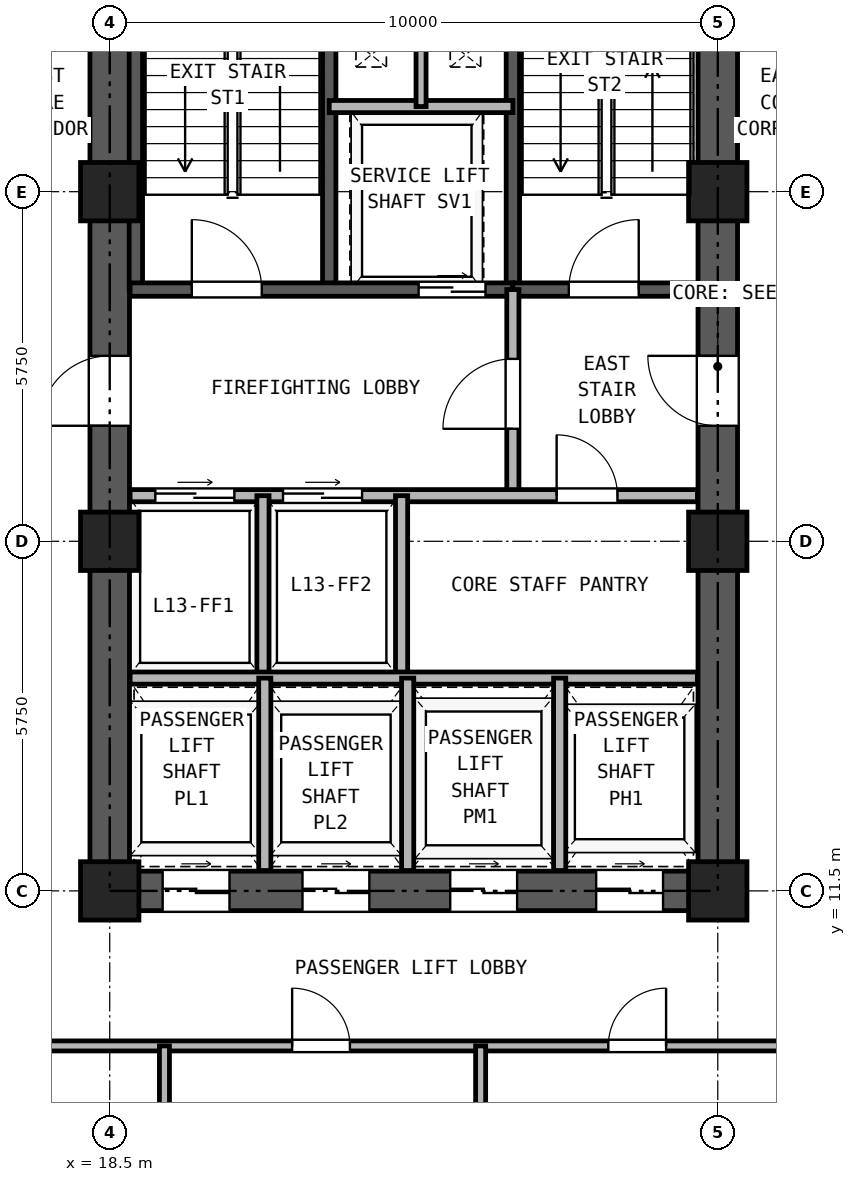
"""IFC4 building model, lengths in metres.
Left out: names, types, materials, properties, quantities, classifications, styles, units other than length and angle.
Written with IfcOpenShell. Run it as: python <this file> out.ifc"""

import sys

from ifc_helpers import new_model, si_unit, direction, frame, frame_2d, origin, origin_2d, place, context, subcontext, project, spatial, rectangle, hollow_rectangle, extrude, source, transform, mapped, element, fill, save


model = new_model("IFC4")
c1 = context("Model", 3, precision=1e-05, world=origin(), true_north=direction((0.0, 1.0)))
c2 = subcontext(c1, "Body", "Model", "MODEL_VIEW")
j1 = project(units=[si_unit("LENGTHUNIT", "METRE"), si_unit("PLANEANGLEUNIT", "RADIAN")], contexts=[c1])
p1 = place(None, origin())
s1 = spatial("IfcSite", under=j1, at=p1, CompositionType="ELEMENT")
p2 = place(p1, origin())
s2 = spatial("IfcBuilding", under=s1, at=p2, CompositionType="ELEMENT")
p3 = place(p2, frame((0.0, 0.0, 51.3)))
s3 = spatial("IfcBuildingStorey", under=s2, at=p3, CompositionType="ELEMENT", Elevation=51.3)
m1 = source(origin(), c2, "Body", "SweptSolid", [
    extrude(hollow_rectangle(XDim=0.96, YDim=0.96, WallThickness=0.06, at=origin_2d()), origin(), (0.0, 0.0, 1.0), 3.32),
])
for number, where, z_axis, x_axis in (
    (1, (18.5, 11.5, 0.0), (0.0, 0.0, 1.0), (1.0, 0.0, 0.0)),
    (2, (18.5, 17.25, 0.0), (0.0, 0.0, 1.0), (1.0, 0.0, 0.0)),
    (3, (18.5, 23.0, 0.0), (0.0, 0.0, 1.0), (1.0, 0.0, 0.0)),
    (4, (28.5, 11.5, 0.0), (0.0, 0.0, 1.0), (1.0, 0.0, 0.0)),
    (5, (28.5, 17.25, 0.0), (0.0, 0.0, 1.0), (1.0, 0.0, 0.0)),
    (6, (28.5, 23.0, 0.0), (0.0, 0.0, 1.0), (1.0, 0.0, 0.0)),
):
    element("IfcColumn", number, at=place(p3, frame(where, z_axis=z_axis, x_axis=x_axis)), inside=s3, PredefinedType="COLUMN", context=c2, shape_type="MappedRepresentation", body=[
        mapped(m1, transform((0.0, 0.0, 0.0), x_axis=(1.0, 0.0, 0.0), y_axis=(0.0, 1.0, 0.0), z_axis=(0.0, 0.0, 1.0), scale=1.0)),
    ])
p4 = place(p3, frame((18.175, 11.5, 0.0), z_axis=(0.0, 0.0, 1.0), x_axis=(1.0, 0.0, 0.0)))
e7 = element("IfcWall", 7, at=p4, inside=s3, PredefinedType="SHEAR", context=c2, shape_type="SweptSolid", body=[
    extrude(rectangle(XDim=10.65, YDim=0.65, at=frame_2d((5.325, 0.0))), origin(), (0.0, 0.0, 1.0), 3.32),
])
p5 = place(p4, frame((1.195, 0.0, 0.0)))
e8 = element("IfcOpeningElement", 8, at=p5, cuts=e7, PredefinedType="OPENING", context=c2, shape_type="SweptSolid", body=[
    extrude(rectangle(XDim=1.1, YDim=2.25, at=frame_2d((0.55, 1.125))), frame((0.0, 0.335, 0.0), z_axis=(0.0, -1.0, 0.0), x_axis=(1.0, 0.0, 0.0)), (0.0, 0.0, 1.0), 0.67),
])
p6 = place(p4, frame((3.495, 0.0, 0.0)))
e9 = element("IfcOpeningElement", 9, at=p6, cuts=e7, PredefinedType="OPENING", context=c2, shape_type="SweptSolid", body=[
    extrude(rectangle(XDim=1.1, YDim=2.25, at=frame_2d((0.55, 1.125))), frame((0.0, 0.335, 0.0), z_axis=(0.0, -1.0, 0.0), x_axis=(1.0, 0.0, 0.0)), (0.0, 0.0, 1.0), 0.67),
])
p7 = place(p4, frame((5.925, 0.0, 0.0)))
e10 = element("IfcOpeningElement", 10, at=p7, cuts=e7, PredefinedType="OPENING", context=c2, shape_type="SweptSolid", body=[
    extrude(rectangle(XDim=1.1, YDim=2.25, at=frame_2d((0.55, 1.125))), frame((0.0, 0.335, 0.0), z_axis=(0.0, -1.0, 0.0), x_axis=(1.0, 0.0, 0.0)), (0.0, 0.0, 1.0), 0.67),
])
p8 = place(p4, frame((8.325, 0.0, 0.0)))
e11 = element("IfcOpeningElement", 11, at=p8, cuts=e7, PredefinedType="OPENING", context=c2, shape_type="SweptSolid", body=[
    extrude(rectangle(XDim=1.1, YDim=2.25, at=frame_2d((0.55, 1.125))), frame((0.0, 0.335, 0.0), z_axis=(0.0, -1.0, 0.0), x_axis=(1.0, 0.0, 0.0)), (0.0, 0.0, 1.0), 0.67),
])
p9 = place(p3, frame((18.5, 11.825, 0.0), z_axis=(0.0, 0.0, 1.0), x_axis=(0.0, 1.0, 0.0)))
e12 = element("IfcWall", 12, at=p9, inside=s3, PredefinedType="SHEAR", context=c2, shape_type="SweptSolid", body=[
    extrude(rectangle(XDim=16.6, YDim=0.65, at=frame_2d((8.3, 0.0))), origin(), (0.0, 0.0, 1.0), 3.32),
])
p10 = place(p9, frame((7.325, 0.0, 0.0)))
e13 = element("IfcOpeningElement", 13, at=p10, cuts=e12, PredefinedType="OPENING", context=c2, shape_type="SweptSolid", body=[
    extrude(rectangle(XDim=1.15, YDim=2.2, at=frame_2d((0.575, 1.1))), frame((0.0, 0.335, 0.0), z_axis=(0.0, -1.0, 0.0), x_axis=(1.0, 0.0, 0.0)), (0.0, 0.0, 1.0), 0.67),
])
p11 = place(p3, frame((28.5, 11.825, 0.0), z_axis=(0.0, 0.0, 1.0), x_axis=(0.0, 1.0, 0.0)))
e14 = element("IfcWall", 14, at=p11, inside=s3, PredefinedType="SHEAR", context=c2, shape_type="SweptSolid", body=[
    extrude(rectangle(XDim=16.6, YDim=0.65, at=frame_2d((8.3, 0.0))), origin(), (0.0, 0.0, 1.0), 3.32),
])
p12 = place(p11, frame((7.325, 0.0, 0.0)))
e15 = element("IfcOpeningElement", 15, at=p12, cuts=e14, PredefinedType="OPENING", context=c2, shape_type="SweptSolid", body=[
    extrude(rectangle(XDim=1.15, YDim=2.2, at=frame_2d((0.575, 1.1))), frame((0.0, 0.335, 0.0), z_axis=(0.0, -1.0, 0.0), x_axis=(1.0, 0.0, 0.0)), (0.0, 0.0, 1.0), 0.67),
])
for number, where, z_axis, x_axis in (
    (16, (18.93, 21.39, 0.0), (0.0, 0.0, 1.0), (0.0, 1.0, 0.0)),
    (17, (22.11, 21.39, 0.0), (0.0, 0.0, 1.0), (0.0, 1.0, 0.0)),
    (18, (25.13, 21.39, 0.0), (0.0, 0.0, 1.0), (0.0, 1.0, 0.0)),
):
    element("IfcWall", number, at=place(p3, frame(where, z_axis=z_axis, x_axis=x_axis)), inside=s3, PredefinedType="SOLIDWALL", context=c2, shape_type="SweptSolid", body=[
        extrude(rectangle(XDim=7.11, YDim=0.22, at=frame_2d((3.555, 0.0))), origin(), (0.0, 0.0, 1.0), 3.32),
    ])
p13 = place(p3, frame((18.835, 21.39, 0.0), z_axis=(0.0, 0.0, 1.0), x_axis=(1.0, 0.0, 0.0)))
e19 = element("IfcWall", 19, at=p13, inside=s3, PredefinedType="SOLIDWALL", context=c2, shape_type="SweptSolid", body=[
    extrude(rectangle(XDim=6.295, YDim=0.22, at=frame_2d((3.147, 0.0))), origin(), (0.0, 0.0, 1.0), 3.32),
])
p14 = place(p13, frame((1.015, 0.0, 0.0)))
e20 = element("IfcOpeningElement", 20, at=p14, cuts=e19, PredefinedType="OPENING", context=c2, shape_type="SweptSolid", body=[
    extrude(rectangle(XDim=1.15, YDim=2.2, at=frame_2d((0.575, 1.1))), frame((0.0, 0.12, 0.0), z_axis=(0.0, -1.0, 0.0), x_axis=(1.0, 0.0, 0.0)), (0.0, 0.0, 1.0), 0.24),
])
p15 = place(p13, frame((4.745, 0.0, 0.0)))
e21 = element("IfcOpeningElement", 21, at=p15, cuts=e19, PredefinedType="OPENING", context=c2, shape_type="SweptSolid", body=[
    extrude(rectangle(XDim=1.1, YDim=2.25, at=frame_2d((0.55, 1.125))), frame((0.0, 0.12, 0.0), z_axis=(0.0, -1.0, 0.0), x_axis=(1.0, 0.0, 0.0)), (0.0, 0.0, 1.0), 0.24),
])
p16 = place(p3, frame((25.13, 21.39, 0.0), z_axis=(0.0, 0.0, 1.0), x_axis=(1.0, 0.0, 0.0)))
e22 = element("IfcWall", 22, at=p16, inside=s3, PredefinedType="SOLIDWALL", context=c2, shape_type="SweptSolid", body=[
    extrude(rectangle(XDim=3.035, YDim=0.22, at=frame_2d((1.518, 0.0))), origin(), (0.0, 0.0, 1.0), 3.32),
])
p17 = place(p16, frame((0.92, 0.0, 0.0)))
e23 = element("IfcOpeningElement", 23, at=p17, cuts=e22, PredefinedType="OPENING", context=c2, shape_type="SweptSolid", body=[
    extrude(rectangle(XDim=1.15, YDim=2.2, at=frame_2d((0.575, 1.1))), frame((0.0, 0.12, 0.0), z_axis=(0.0, -1.0, 0.0), x_axis=(1.0, 0.0, 0.0)), (0.0, 0.0, 1.0), 0.24),
])
p18 = place(p3, frame((22.11, 24.4, 0.0), z_axis=(0.0, 0.0, 1.0), x_axis=(1.0, 0.0, 0.0)))
e24 = element("IfcWall", 24, at=p18, inside=s3, PredefinedType="PARTITIONING", context=c2, shape_type="SweptSolid", body=[
    extrude(rectangle(XDim=3.02, YDim=0.2, at=frame_2d((1.51, 0.0))), origin(), (0.0, 0.0, 1.0), 3.32),
])
p19 = place(p3, frame((23.62, 24.4, 0.0), z_axis=(0.0, 0.0, 1.0), x_axis=(0.0, 1.0, 0.0)))
e25 = element("IfcWall", 25, at=p19, inside=s3, PredefinedType="PARTITIONING", context=c2, shape_type="SweptSolid", body=[
    extrude(rectangle(XDim=4.015, YDim=0.165, at=frame_2d((2.008, 0.0))), origin(), (0.0, 0.0, 1.0), 3.32),
])
p20 = place(p3, frame((25.13, 18.0, 0.0), z_axis=(0.0, 0.0, 1.0), x_axis=(0.0, 1.0, 0.0)))
e26 = element("IfcWall", 26, at=p20, inside=s3, PredefinedType="PARTITIONING", context=c2, shape_type="SweptSolid", body=[
    extrude(rectangle(XDim=3.39, YDim=0.2, at=frame_2d((1.695, 0.0))), origin(), (0.0, 0.0, 1.0), 3.32),
])
p21 = place(p20, frame((1.1, 0.0, 0.0)))
e27 = element("IfcOpeningElement", 27, at=p21, cuts=e26, PredefinedType="OPENING", context=c2, shape_type="SweptSolid", body=[
    extrude(rectangle(XDim=1.15, YDim=2.2, at=frame_2d((0.575, 1.1))), frame((0.0, 0.11, 0.0), z_axis=(0.0, -1.0, 0.0), x_axis=(1.0, 0.0, 0.0)), (0.0, 0.0, 1.0), 0.22),
])
p22 = place(p3, frame((18.835, 18.0, 0.0), z_axis=(0.0, 0.0, 1.0), x_axis=(1.0, 0.0, 0.0)))
e28 = element("IfcWall", 28, at=p22, inside=s3, PredefinedType="PARTITIONING", context=c2, shape_type="SweptSolid", body=[
    extrude(rectangle(XDim=9.33, YDim=0.2, at=frame_2d((4.665, 0.0))), origin(), (0.0, 0.0, 1.0), 3.32),
])
p23 = place(p22, frame((0.415, 0.0, 0.0)))
e29 = element("IfcOpeningElement", 29, at=p23, cuts=e28, PredefinedType="OPENING", context=c2, shape_type="SweptSolid", body=[
    extrude(rectangle(XDim=1.3, YDim=2.3, at=frame_2d((0.65, 1.15))), frame((0.0, 0.11, 0.0), z_axis=(0.0, -1.0, 0.0), x_axis=(1.0, 0.0, 0.0)), (0.0, 0.0, 1.0), 0.22),
])
p24 = place(p22, frame((2.515, 0.0, 0.0)))
e30 = element("IfcOpeningElement", 30, at=p24, cuts=e28, PredefinedType="OPENING", context=c2, shape_type="SweptSolid", body=[
    extrude(rectangle(XDim=1.3, YDim=2.3, at=frame_2d((0.65, 1.15))), frame((0.0, 0.11, 0.0), z_axis=(0.0, -1.0, 0.0), x_axis=(1.0, 0.0, 0.0)), (0.0, 0.0, 1.0), 0.22),
])
p25 = place(p22, frame((7.015, 0.0, 0.0)))
e31 = element("IfcOpeningElement", 31, at=p25, cuts=e28, PredefinedType="OPENING", context=c2, shape_type="SweptSolid", body=[
    extrude(rectangle(XDim=1.0, YDim=2.15, at=frame_2d((0.5, 1.075))), frame((0.0, 0.11, 0.0), z_axis=(0.0, -1.0, 0.0), x_axis=(1.0, 0.0, 0.0)), (0.0, 0.0, 1.0), 0.22),
])
for number, where, z_axis, x_axis in (
    (32, (21.02, 15.0, 0.0), (0.0, 0.0, 1.0), (0.0, 1.0, 0.0)),
    (33, (23.3, 15.0, 0.0), (0.0, 0.0, 1.0), (0.0, 1.0, 0.0)),
):
    element("IfcWall", number, at=place(p3, frame(where, z_axis=z_axis, x_axis=x_axis)), inside=s3, PredefinedType="PARTITIONING", context=c2, shape_type="SweptSolid", body=[
        extrude(rectangle(XDim=3.0, YDim=0.2, at=frame_2d((1.5, 0.0))), origin(), (0.0, 0.0, 1.0), 3.32),
    ])
p26 = place(p3, frame((18.835, 15.0, 0.0), z_axis=(0.0, 0.0, 1.0), x_axis=(1.0, 0.0, 0.0)))
e34 = element("IfcWall", 34, at=p26, inside=s3, PredefinedType="PARTITIONING", context=c2, shape_type="SweptSolid", body=[
    extrude(rectangle(XDim=9.33, YDim=0.2, at=frame_2d((4.665, 0.0))), origin(), (0.0, 0.0, 1.0), 3.32),
])
for number, where, z_axis, x_axis in (
    (35, (21.05, 11.835, 0.0), (0.0, 0.0, 1.0), (0.0, 1.0, 0.0)),
    (36, (23.4, 11.835, 0.0), (0.0, 0.0, 1.0), (0.0, 1.0, 0.0)),
    (37, (25.9, 11.835, 0.0), (0.0, 0.0, 1.0), (0.0, 1.0, 0.0)),
):
    element("IfcWall", number, at=place(p3, frame(where, z_axis=z_axis, x_axis=x_axis)), inside=s3, PredefinedType="PARTITIONING", context=c2, shape_type="SweptSolid", body=[
        extrude(rectangle(XDim=3.165, YDim=0.2, at=frame_2d((1.583, 0.0))), origin(), (0.0, 0.0, 1.0), 3.32),
    ])
p27 = place(p3, frame((9.0, 8.95, 0.0), z_axis=(0.0, 0.0, 1.0), x_axis=(1.0, 0.0, 0.0)))
e38 = element("IfcWall", 38, at=p27, inside=s3, PredefinedType="PARTITIONING", context=c2, shape_type="SweptSolid", body=[
    extrude(rectangle(XDim=29.0, YDim=0.165, at=frame_2d((14.5, 0.0))), origin(), (0.0, 0.0, 1.0), 3.32),
])
p28 = place(p27, frame((2.1, 0.0, 0.0)))
e39 = element("IfcOpeningElement", 39, at=p28, cuts=e38, PredefinedType="OPENING", context=c2, shape_type="SweptSolid", body=[
    extrude(rectangle(XDim=0.95, YDim=2.15, at=frame_2d((0.475, 1.075))), frame((0.0, 0.093, 0.0), z_axis=(0.0, -1.0, 0.0), x_axis=(1.0, 0.0, 0.0)), (0.0, 0.0, 1.0), 0.185),
])
p29 = place(p27, frame((7.3, 0.0, 0.0)))
e40 = element("IfcOpeningElement", 40, at=p29, cuts=e38, PredefinedType="OPENING", context=c2, shape_type="SweptSolid", body=[
    extrude(rectangle(XDim=0.95, YDim=2.15, at=frame_2d((0.475, 1.075))), frame((0.0, 0.093, 0.0), z_axis=(0.0, -1.0, 0.0), x_axis=(1.0, 0.0, 0.0)), (0.0, 0.0, 1.0), 0.185),
])
p30 = place(p27, frame((12.5, 0.0, 0.0)))
e41 = element("IfcOpeningElement", 41, at=p30, cuts=e38, PredefinedType="OPENING", context=c2, shape_type="SweptSolid", body=[
    extrude(rectangle(XDim=0.95, YDim=2.15, at=frame_2d((0.475, 1.075))), frame((0.0, 0.093, 0.0), z_axis=(0.0, -1.0, 0.0), x_axis=(1.0, 0.0, 0.0)), (0.0, 0.0, 1.0), 0.185),
])
p31 = place(p27, frame((17.7, 0.0, 0.0)))
e42 = element("IfcOpeningElement", 42, at=p31, cuts=e38, PredefinedType="OPENING", context=c2, shape_type="SweptSolid", body=[
    extrude(rectangle(XDim=0.95, YDim=2.15, at=frame_2d((0.475, 1.075))), frame((0.0, 0.093, 0.0), z_axis=(0.0, -1.0, 0.0), x_axis=(1.0, 0.0, 0.0)), (0.0, 0.0, 1.0), 0.185),
])
p32 = place(p27, frame((22.3, 0.0, 0.0)))
e43 = element("IfcOpeningElement", 43, at=p32, cuts=e38, PredefinedType="OPENING", context=c2, shape_type="SweptSolid", body=[
    extrude(rectangle(XDim=0.95, YDim=2.15, at=frame_2d((0.475, 1.075))), frame((0.0, 0.093, 0.0), z_axis=(0.0, -1.0, 0.0), x_axis=(1.0, 0.0, 0.0)), (0.0, 0.0, 1.0), 0.185),
])
p33 = place(p27, frame((25.4, 0.0, 0.0)))
e44 = element("IfcOpeningElement", 44, at=p33, cuts=e38, PredefinedType="OPENING", context=c2, shape_type="SweptSolid", body=[
    extrude(rectangle(XDim=0.92, YDim=2.1, at=frame_2d((0.46, 1.05))), frame((0.0, 0.093, 0.0), z_axis=(0.0, -1.0, 0.0), x_axis=(1.0, 0.0, 0.0)), (0.0, 0.0, 1.0), 0.185),
])
p34 = place(p27, frame((27.5, 0.0, 0.0)))
e45 = element("IfcOpeningElement", 45, at=p34, cuts=e38, PredefinedType="OPENING", context=c2, shape_type="SweptSolid", body=[
    extrude(rectangle(XDim=0.92, YDim=2.1, at=frame_2d((0.46, 1.05))), frame((0.0, 0.093, 0.0), z_axis=(0.0, -1.0, 0.0), x_axis=(1.0, 0.0, 0.0)), (0.0, 0.0, 1.0), 0.185),
])
for number, where, z_axis, x_axis in (
    (46, (19.4, 0.16, 0.0), (0.0, 0.0, 1.0), (0.0, 1.0, 0.0)),
    (47, (24.6, 0.16, 0.0), (0.0, 0.0, 1.0), (0.0, 1.0, 0.0)),
):
    element("IfcWall", number, at=place(p3, frame(where, z_axis=z_axis, x_axis=x_axis)), inside=s3, PredefinedType="PARTITIONING", context=c2, shape_type="SweptSolid", body=[
        extrude(rectangle(XDim=8.79, YDim=0.165, at=frame_2d((4.395, 0.0))), origin(), (0.0, 0.0, 1.0), 3.32),
    ])
p35 = place(p14, frame((1.15, 0.0, 0.0), z_axis=(0.0, 0.0, 1.0), x_axis=(-1.0, 0.0, 0.0)))
e48 = element("IfcDoor", 48, at=p35, inside=s3, OperationType="SINGLE_SWING_LEFT", PredefinedType="DOOR", context=c2, shape_type="SweptSolid", body=[
    extrude(rectangle(XDim=1.15, YDim=2.2, at=frame_2d((0.575, 1.1))), frame((0.0, 0.025, 0.0), z_axis=(0.0, -1.0, 0.0), x_axis=(1.0, 0.0, 0.0)), (0.0, 0.0, 1.0), 0.05),
])
fill(e20, e48)
p36 = place(p17, frame((1.15, 0.0, 0.0), z_axis=(0.0, 0.0, 1.0), x_axis=(-1.0, 0.0, 0.0)))
e49 = element("IfcDoor", 49, at=p36, inside=s3, OperationType="SINGLE_SWING_RIGHT", PredefinedType="DOOR", context=c2, shape_type="SweptSolid", body=[
    extrude(rectangle(XDim=1.15, YDim=2.2, at=frame_2d((0.575, 1.1))), frame((0.0, 0.025, 0.0), z_axis=(0.0, -1.0, 0.0), x_axis=(1.0, 0.0, 0.0)), (0.0, 0.0, 1.0), 0.05),
])
fill(e23, e49)
p37 = place(p15, frame((1.1, 0.0, 0.0), z_axis=(0.0, 0.0, 1.0), x_axis=(-1.0, 0.0, 0.0)))
e50 = element("IfcDoor", 50, at=p37, inside=s3, OperationType="DOUBLE_DOOR_SLIDING", PredefinedType="DOOR", context=c2, shape_type="SweptSolid", body=[
    extrude(rectangle(XDim=1.1, YDim=2.25, at=frame_2d((0.55, 1.125))), frame((0.0, 0.025, 0.0), z_axis=(0.0, -1.0, 0.0), x_axis=(1.0, 0.0, 0.0)), (0.0, 0.0, 1.0), 0.05),
])
fill(e21, e50)
p38 = place(p21, origin())
e51 = element("IfcDoor", 51, at=p38, inside=s3, OperationType="SINGLE_SWING_LEFT", PredefinedType="DOOR", context=c2, shape_type="SweptSolid", body=[
    extrude(rectangle(XDim=1.15, YDim=2.2, at=frame_2d((0.575, 1.1))), frame((0.0, 0.025, 0.0), z_axis=(0.0, -1.0, 0.0), x_axis=(1.0, 0.0, 0.0)), (0.0, 0.0, 1.0), 0.05),
])
fill(e27, e51)
p39 = place(p23, origin())
e52 = element("IfcDoor", 52, at=p39, inside=s3, OperationType="DOUBLE_DOOR_SLIDING", PredefinedType="DOOR", context=c2, shape_type="SweptSolid", body=[
    extrude(rectangle(XDim=1.3, YDim=2.3, at=frame_2d((0.65, 1.15))), frame((0.0, 0.025, 0.0), z_axis=(0.0, -1.0, 0.0), x_axis=(1.0, 0.0, 0.0)), (0.0, 0.0, 1.0), 0.05),
])
fill(e29, e52)
p40 = place(p24, origin())
e53 = element("IfcDoor", 53, at=p40, inside=s3, OperationType="DOUBLE_DOOR_SLIDING", PredefinedType="DOOR", context=c2, shape_type="SweptSolid", body=[
    extrude(rectangle(XDim=1.3, YDim=2.3, at=frame_2d((0.65, 1.15))), frame((0.0, 0.025, 0.0), z_axis=(0.0, -1.0, 0.0), x_axis=(1.0, 0.0, 0.0)), (0.0, 0.0, 1.0), 0.05),
])
fill(e30, e53)
p41 = place(p25, frame((1.0, 0.0, 0.0), z_axis=(0.0, 0.0, 1.0), x_axis=(-1.0, 0.0, 0.0)))
e54 = element("IfcDoor", 54, at=p41, inside=s3, OperationType="SINGLE_SWING_LEFT", PredefinedType="DOOR", context=c2, shape_type="SweptSolid", body=[
    extrude(rectangle(XDim=1.0, YDim=2.15, at=frame_2d((0.5, 1.075))), frame((0.0, 0.025, 0.0), z_axis=(0.0, -1.0, 0.0), x_axis=(1.0, 0.0, 0.0)), (0.0, 0.0, 1.0), 0.05),
])
fill(e31, e54)
p42 = place(p10, frame((1.15, 0.0, 0.0), z_axis=(0.0, 0.0, 1.0), x_axis=(-1.0, 0.0, 0.0)))
e55 = element("IfcDoor", 55, at=p42, inside=s3, OperationType="SINGLE_SWING_LEFT", PredefinedType="DOOR", context=c2, shape_type="SweptSolid", body=[
    extrude(rectangle(XDim=1.15, YDim=2.2, at=frame_2d((0.575, 1.1))), frame((0.0, 0.025, 0.0), z_axis=(0.0, -1.0, 0.0), x_axis=(1.0, 0.0, 0.0)), (0.0, 0.0, 1.0), 0.05),
])
fill(e13, e55)
p43 = place(p12, origin())
e56 = element("IfcDoor", 56, at=p43, inside=s3, OperationType="SINGLE_SWING_RIGHT", PredefinedType="DOOR", context=c2, shape_type="SweptSolid", body=[
    extrude(rectangle(XDim=1.15, YDim=2.2, at=frame_2d((0.575, 1.1))), frame((0.0, 0.025, 0.0), z_axis=(0.0, -1.0, 0.0), x_axis=(1.0, 0.0, 0.0)), (0.0, 0.0, 1.0), 0.05),
])
fill(e15, e56)
p44 = place(p5, frame((1.1, 0.0, 0.0), z_axis=(0.0, 0.0, 1.0), x_axis=(-1.0, 0.0, 0.0)))
e57 = element("IfcDoor", 57, at=p44, inside=s3, OperationType="DOUBLE_DOOR_SLIDING", PredefinedType="DOOR", context=c2, shape_type="SweptSolid", body=[
    extrude(rectangle(XDim=1.1, YDim=2.25, at=frame_2d((0.55, 1.125))), frame((0.0, 0.025, 0.0), z_axis=(0.0, -1.0, 0.0), x_axis=(1.0, 0.0, 0.0)), (0.0, 0.0, 1.0), 0.05),
])
fill(e8, e57)
p45 = place(p6, frame((1.1, 0.0, 0.0), z_axis=(0.0, 0.0, 1.0), x_axis=(-1.0, 0.0, 0.0)))
e58 = element("IfcDoor", 58, at=p45, inside=s3, OperationType="DOUBLE_DOOR_SLIDING", PredefinedType="DOOR", context=c2, shape_type="SweptSolid", body=[
    extrude(rectangle(XDim=1.1, YDim=2.25, at=frame_2d((0.55, 1.125))), frame((0.0, 0.025, 0.0), z_axis=(0.0, -1.0, 0.0), x_axis=(1.0, 0.0, 0.0)), (0.0, 0.0, 1.0), 0.05),
])
fill(e9, e58)
p46 = place(p7, frame((1.1, 0.0, 0.0), z_axis=(0.0, 0.0, 1.0), x_axis=(-1.0, 0.0, 0.0)))
e59 = element("IfcDoor", 59, at=p46, inside=s3, OperationType="DOUBLE_DOOR_SLIDING", PredefinedType="DOOR", context=c2, shape_type="SweptSolid", body=[
    extrude(rectangle(XDim=1.1, YDim=2.25, at=frame_2d((0.55, 1.125))), frame((0.0, 0.025, 0.0), z_axis=(0.0, -1.0, 0.0), x_axis=(1.0, 0.0, 0.0)), (0.0, 0.0, 1.0), 0.05),
])
fill(e10, e59)
p47 = place(p8, frame((1.1, 0.0, 0.0), z_axis=(0.0, 0.0, 1.0), x_axis=(-1.0, 0.0, 0.0)))
e60 = element("IfcDoor", 60, at=p47, inside=s3, OperationType="DOUBLE_DOOR_SLIDING", PredefinedType="DOOR", context=c2, shape_type="SweptSolid", body=[
    extrude(rectangle(XDim=1.1, YDim=2.25, at=frame_2d((0.55, 1.125))), frame((0.0, 0.025, 0.0), z_axis=(0.0, -1.0, 0.0), x_axis=(1.0, 0.0, 0.0)), (0.0, 0.0, 1.0), 0.05),
])
fill(e11, e60)
p48 = place(p30, frame((0.95, 0.0, 0.0), z_axis=(0.0, 0.0, 1.0), x_axis=(-1.0, 0.0, 0.0)))
e61 = element("IfcDoor", 61, at=p48, inside=s3, OperationType="SINGLE_SWING_LEFT", PredefinedType="DOOR", context=c2, shape_type="SweptSolid", body=[
    extrude(rectangle(XDim=0.95, YDim=2.15, at=frame_2d((0.475, 1.075))), frame((0.0, 0.025, 0.0), z_axis=(0.0, -1.0, 0.0), x_axis=(1.0, 0.0, 0.0)), (0.0, 0.0, 1.0), 0.05),
])
fill(e41, e61)
p49 = place(p31, frame((0.95, 0.0, 0.0), z_axis=(0.0, 0.0, 1.0), x_axis=(-1.0, 0.0, 0.0)))
e62 = element("IfcDoor", 62, at=p49, inside=s3, OperationType="SINGLE_SWING_RIGHT", PredefinedType="DOOR", context=c2, shape_type="SweptSolid", body=[
    extrude(rectangle(XDim=0.95, YDim=2.15, at=frame_2d((0.475, 1.075))), frame((0.0, 0.025, 0.0), z_axis=(0.0, -1.0, 0.0), x_axis=(1.0, 0.0, 0.0)), (0.0, 0.0, 1.0), 0.05),
])
fill(e42, e62)
save(model, sys.argv[1])
